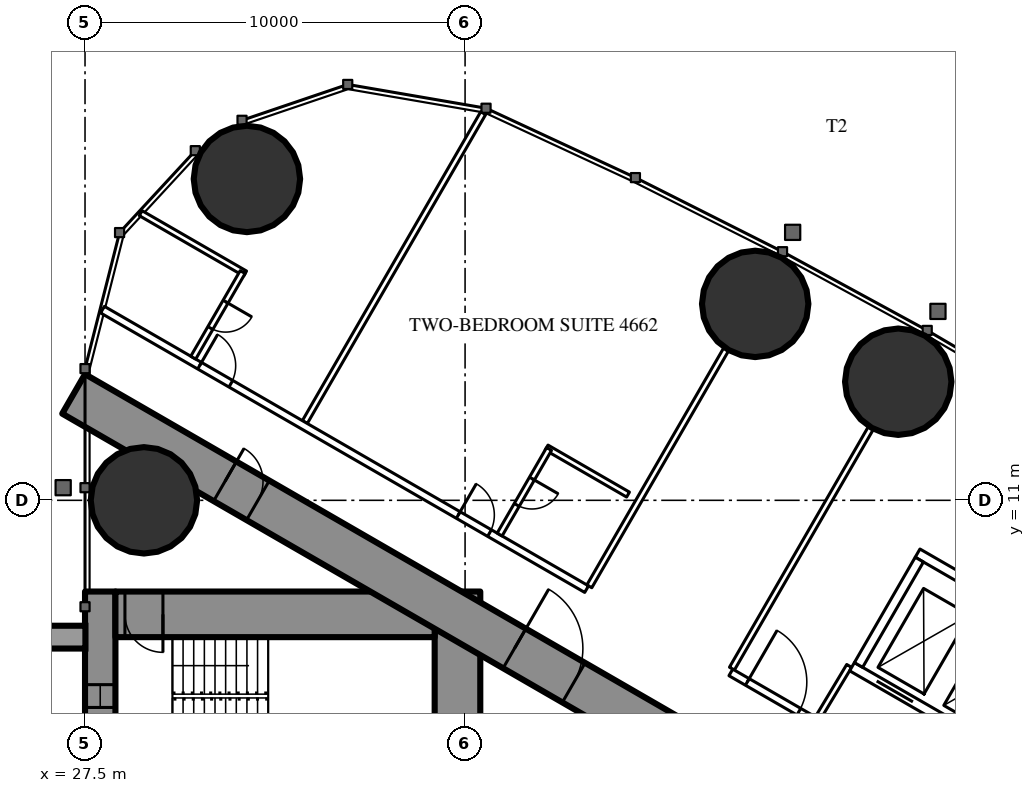
"""IFC4 building model, lengths in metres.
Left out: names, types, materials, properties, quantities, classifications, styles, units other than length and angle.
Written with IfcOpenShell. Run it as: python <this file> out.ifc"""

import sys

from ifc_helpers import new_model, si_unit, direction, frame, frame_2d, origin, origin_2d, place, context, subcontext, project, spatial, rectangle, circle, extrude, element, fill, save


model = new_model("IFC4")
c1 = context("Model", 3, precision=1e-05, world=origin(), true_north=direction((0.0, 1.0)))
c2 = subcontext(c1, "Body", "Model", "MODEL_VIEW")
j1 = project(units=[si_unit("LENGTHUNIT", "METRE"), si_unit("PLANEANGLEUNIT", "RADIAN")], contexts=[c1])
p1 = place(None, origin())
s1 = spatial("IfcSite", under=j1, at=p1, CompositionType="ELEMENT")
p2 = place(p1, origin())
s2 = spatial("IfcBuilding", under=s1, at=p2, CompositionType="ELEMENT")
p3 = place(p2, frame((0.0, 0.0, 173.8)))
s3 = spatial("IfcBuildingStorey", under=s2, at=p3, CompositionType="ELEMENT", Elevation=173.8)
for number, where, z_axis, x_axis in (
    (1, (31.76, 19.456, 0.0), (0.0, 0.0, 1.0), (1.0, 0.0, 0.0)),
    (2, (29.05, 11.0, 0.0), (0.0, 0.0, 1.0), (1.0, 0.0, 0.0)),
    (3, (48.897, 14.121, 0.0), (0.0, 0.0, 1.0), (1.0, 0.0, 0.0)),
    (4, (45.134, 16.168, 0.0), (0.0, 0.0, 1.0), (1.0, 0.0, 0.0)),
):
    element("IfcColumn", number, at=place(p3, frame(where, z_axis=z_axis, x_axis=x_axis)), inside=s3, PredefinedType="COLUMN", context=c2, shape_type="SweptSolid", body=[
        extrude(circle(Radius=1.4, at=origin_2d()), origin(), (0.0, 0.0, 1.0), 3.5),
    ])
p4 = place(p3, frame((27.9, -8.6, 0.0), z_axis=(0.0, 0.0, 1.0), x_axis=(0.0, 1.0, 0.0)))
e5 = element("IfcWall", 5, at=p4, inside=s3, PredefinedType="SHEAR", context=c2, shape_type="SweptSolid", body=[
    extrude(rectangle(XDim=17.2, YDim=0.8, at=frame_2d((8.6, 0.0))), origin(), (0.0, 0.0, 1.0), 3.5),
])
p5 = place(p4, frame((2.45, 0.0, 0.6)))
e6 = element("IfcOpeningElement", 6, at=p5, cuts=e5, PredefinedType="OPENING", context=c2, shape_type="SweptSolid", body=[
    extrude(rectangle(XDim=0.6, YDim=2.1, at=frame_2d((0.3, 1.05))), frame((0.0, 0.41, 0.0), z_axis=(0.0, -1.0, 0.0), x_axis=(1.0, 0.0, 0.0)), (0.0, 0.0, 1.0), 0.82),
])
p6 = place(p4, frame((14.15, 0.0, 0.6)))
e7 = element("IfcOpeningElement", 7, at=p6, cuts=e5, PredefinedType="OPENING", context=c2, shape_type="SweptSolid", body=[
    extrude(rectangle(XDim=0.6, YDim=2.1, at=frame_2d((0.3, 1.05))), frame((0.0, 0.41, 0.0), z_axis=(0.0, -1.0, 0.0), x_axis=(1.0, 0.0, 0.0)), (0.0, 0.0, 1.0), 0.82),
])
p7 = place(p3, frame((37.3, -8.6, 0.0), z_axis=(0.0, 0.0, 1.0), x_axis=(0.0, 1.0, 0.0)))
e8 = element("IfcWall", 8, at=p7, inside=s3, PredefinedType="SHEAR", context=c2, shape_type="SweptSolid", body=[
    extrude(rectangle(XDim=17.2, YDim=1.2, at=frame_2d((8.6, 0.0))), origin(), (0.0, 0.0, 1.0), 3.5),
])
p8 = place(p7, frame((7.7, 0.0, 0.0)))
e9 = element("IfcOpeningElement", 9, at=p8, cuts=e8, PredefinedType="OPENING", context=c2, shape_type="SweptSolid", body=[
    extrude(rectangle(XDim=1.8, YDim=2.2, at=frame_2d((0.9, 1.1))), frame((0.0, 0.61, 0.0), z_axis=(0.0, -1.0, 0.0), x_axis=(1.0, 0.0, 0.0)), (0.0, 0.0, 1.0), 1.22),
])
p9 = place(p3, frame((28.3, 8.0, 0.0), z_axis=(0.0, 0.0, 1.0), x_axis=(1.0, 0.0, 0.0)))
e10 = element("IfcWall", 10, at=p9, inside=s3, PredefinedType="SHEAR", context=c2, shape_type="SweptSolid", body=[
    extrude(rectangle(XDim=8.4, YDim=1.2, at=frame_2d((4.2, 0.0))), origin(), (0.0, 0.0, 1.0), 3.5),
])
p10 = place(p9, frame((0.25, 0.0, 0.0)))
e11 = element("IfcOpeningElement", 11, at=p10, cuts=e10, PredefinedType="OPENING", context=c2, shape_type="SweptSolid", body=[
    extrude(rectangle(XDim=1.0, YDim=2.2, at=frame_2d((0.5, 1.1))), frame((0.0, 0.61, 0.0), z_axis=(0.0, -1.0, 0.0), x_axis=(1.0, 0.0, 0.0)), (0.0, 0.0, 1.0), 1.22),
])
p11 = place(p3, frame((27.2, 13.8, 0.0), z_axis=(0.0, 0.0, 1.0), x_axis=(0.866024515034, -0.500001539357, 0.0)))
e12 = element("IfcWall", 12, at=p11, inside=s3, PredefinedType="SHEAR", context=c2, shape_type="SweptSolid", body=[
    extrude(rectangle(XDim=26.907, YDim=1.2, at=frame_2d((13.454, 0.0))), origin(), (0.0, 0.0, 1.0), 3.5),
])
p12 = place(p11, frame((4.6, 0.0, 0.0)))
e13 = element("IfcOpeningElement", 13, at=p12, cuts=e12, PredefinedType="OPENING", context=c2, shape_type="SweptSolid", body=[
    extrude(rectangle(XDim=1.0, YDim=2.2, at=frame_2d((0.5, 1.1))), frame((0.0, 0.61, 0.0), z_axis=(0.0, -1.0, 0.0), x_axis=(1.0, 0.0, 0.0)), (0.0, 0.0, 1.0), 1.22),
])
p13 = place(p11, frame((13.395, 0.0, 0.0)))
e14 = element("IfcOpeningElement", 14, at=p13, cuts=e12, PredefinedType="OPENING", context=c2, shape_type="SweptSolid", body=[
    extrude(rectangle(XDim=1.8, YDim=2.2, at=frame_2d((0.9, 1.1))), frame((0.0, 0.61, 0.0), z_axis=(0.0, -1.0, 0.0), x_axis=(1.0, 0.0, 0.0)), (0.0, 0.0, 1.0), 1.22),
])
p14 = place(p3, frame((33.284, 13.059, 0.0), z_axis=(0.0, 0.0, 1.0), x_axis=(0.499985904184, 0.866033541855, 0.0)))
e15 = element("IfcWall", 15, at=p14, inside=s3, PredefinedType="PARTITIONING", context=c2, shape_type="SweptSolid", body=[
    extrude(rectangle(XDim=9.385, YDim=0.15, at=frame_2d((4.693, 0.0))), origin(), (0.0, 0.0, 1.0), 3.25),
])
p15 = place(p3, frame((40.769, 8.737, 0.0), z_axis=(0.0, 0.0, 1.0), x_axis=(0.500013115284, 0.866017831539, 0.0)))
e16 = element("IfcWall", 16, at=p15, inside=s3, PredefinedType="PARTITIONING", context=c2, shape_type="SweptSolid", body=[
    extrude(rectangle(XDim=7.198, YDim=0.15, at=frame_2d((3.599, 0.0))), origin(), (0.0, 0.0, 1.0), 2.3),
])
p16 = place(p3, frame((44.521, 6.571, 0.0), z_axis=(0.0, 0.0, 1.0), x_axis=(0.500020376429, 0.866013639128, 0.0)))
e17 = element("IfcWall", 17, at=p16, inside=s3, PredefinedType="PARTITIONING", context=c2, shape_type="SweptSolid", body=[
    extrude(rectangle(XDim=7.306, YDim=0.15, at=frame_2d((3.653, 0.0))), origin(), (0.0, 0.0, 1.0), 2.3),
])
p17 = place(p3, frame((47.606, 6.643, 0.0), z_axis=(0.0, 0.0, 1.0), x_axis=(-0.514237157483, -0.857648031458, 0.0)))
e18 = element("IfcWall", 18, at=p17, inside=s3, PredefinedType="PARTITIONING", context=c2, shape_type="SweptSolid", body=[
    extrude(rectangle(XDim=1.805, YDim=0.15, at=frame_2d((0.902, 0.0))), origin(), (0.0, 0.0, 1.0), 3.25),
])
p18 = place(p3, frame((27.959, 16.017, 0.0), z_axis=(0.0, 0.0, 1.0), x_axis=(0.866024165033, -0.500002145574, 0.0)))
e19 = element("IfcWall", 19, at=p18, inside=s3, PredefinedType="PARTITIONING", context=c2, shape_type="SweptSolid", body=[
    extrude(rectangle(XDim=14.709, YDim=0.2, at=frame_2d((7.354, 0.0))), origin(), (0.0, 0.0, 1.0), 3.25),
])
p19 = place(p18, frame((10.809, 0.0, 0.0)))
e20 = element("IfcOpeningElement", 20, at=p19, cuts=e19, PredefinedType="OPENING", context=c2, shape_type="SweptSolid", body=[
    extrude(rectangle(XDim=0.95, YDim=2.2, at=frame_2d((0.475, 1.1))), frame((0.0, 0.11, 0.0), z_axis=(0.0, -1.0, 0.0), x_axis=(1.0, 0.0, 0.0)), (0.0, 0.0, 1.0), 0.22),
])
p20 = place(p18, frame((2.95, 0.0, 0.0)))
e21 = element("IfcOpeningElement", 21, at=p20, cuts=e19, PredefinedType="OPENING", context=c2, shape_type="SweptSolid", body=[
    extrude(rectangle(XDim=0.95, YDim=2.2, at=frame_2d((0.475, 1.1))), frame((0.0, 0.11, 0.0), z_axis=(0.0, -1.0, 0.0), x_axis=(1.0, 0.0, 0.0)), (0.0, 0.0, 1.0), 0.22),
])
p21 = place(p3, frame((44.493, 6.472, 0.0), z_axis=(0.0, 0.0, 1.0), x_axis=(0.866027140358, -0.499996992154, 0.0)))
e22 = element("IfcWall", 22, at=p21, inside=s3, PredefinedType="PARTITIONING", context=c2, shape_type="SweptSolid", body=[
    extrude(rectangle(XDim=2.566, YDim=0.2, at=frame_2d((1.283, 0.0))), origin(), (0.0, 0.0, 1.0), 3.25),
])
p22 = place(p21, frame((0.5, 0.0, 0.0)))
e23 = element("IfcOpeningElement", 23, at=p22, cuts=e22, PredefinedType="OPENING", context=c2, shape_type="SweptSolid", body=[
    extrude(rectangle(XDim=1.566, YDim=2.2, at=frame_2d((0.783, 1.1))), frame((0.0, 0.11, 0.0), z_axis=(0.0, -1.0, 0.0), x_axis=(1.0, 0.0, 0.0)), (0.0, 0.0, 1.0), 0.22),
])
p23 = place(p3, frame((39.645, 12.389, 0.0), z_axis=(0.0, 0.0, 1.0), x_axis=(0.866006523861, -0.500032699561, 0.0)))
e24 = element("IfcWall", 24, at=p23, inside=s3, PredefinedType="PARTITIONING", context=c2, shape_type="SweptSolid", body=[
    extrude(rectangle(XDim=2.475, YDim=0.15, at=frame_2d((1.237, 0.0))), origin(), (0.0, 0.0, 1.0), 3.25),
])
p24 = place(p3, frame((38.409, 10.099, 0.0), z_axis=(0.0, 0.0, 1.0), x_axis=(0.500006934395, 0.866021400173, 0.0)))
e25 = element("IfcWall", 25, at=p24, inside=s3, PredefinedType="PARTITIONING", context=c2, shape_type="SweptSolid", body=[
    extrude(rectangle(XDim=2.6, YDim=0.15, at=frame_2d((1.3, 0.0))), origin(), (0.0, 0.0, 1.0), 3.25),
])
p25 = place(p24, frame((0.9, 0.0, 0.0)))
e26 = element("IfcOpeningElement", 26, at=p25, cuts=e25, PredefinedType="OPENING", context=c2, shape_type="SweptSolid", body=[
    extrude(rectangle(XDim=0.8, YDim=2.2, at=frame_2d((0.4, 1.1))), frame((0.0, 0.085, 0.0), z_axis=(0.0, -1.0, 0.0), x_axis=(1.0, 0.0, 0.0)), (0.0, 0.0, 1.0), 0.17),
])
p26 = place(p3, frame((28.965, 18.554, 0.0), z_axis=(0.0, 0.0, 1.0), x_axis=(0.866008740531, -0.500028860491, 0.0)))
e27 = element("IfcWall", 27, at=p26, inside=s3, PredefinedType="PARTITIONING", context=c2, shape_type="SweptSolid", body=[
    extrude(rectangle(XDim=3.173, YDim=0.15, at=frame_2d((1.586, 0.0))), origin(), (0.0, 0.0, 1.0), 3.25),
])
p27 = place(p3, frame((30.348, 14.754, 0.0), z_axis=(0.0, 0.0, 1.0), x_axis=(0.500006934395, 0.866021400173, 0.0)))
e28 = element("IfcWall", 28, at=p27, inside=s3, PredefinedType="PARTITIONING", context=c2, shape_type="SweptSolid", body=[
    extrude(rectangle(XDim=2.6, YDim=0.15, at=frame_2d((1.3, 0.0))), origin(), (0.0, 0.0, 1.0), 2.3),
])
p28 = place(p27, frame((0.9, 0.0, 0.0)))
e29 = element("IfcOpeningElement", 29, at=p28, cuts=e28, PredefinedType="OPENING", context=c2, shape_type="SweptSolid", body=[
    extrude(rectangle(XDim=0.8, YDim=2.2, at=frame_2d((0.4, 1.1))), frame((0.0, 0.085, 0.0), z_axis=(0.0, -1.0, 0.0), x_axis=(1.0, 0.0, 0.0)), (0.0, 0.0, 1.0), 0.17),
])
p29 = place(p3, frame((47.681, 6.622, 0.0), z_axis=(0.0, 0.0, 1.0), x_axis=(0.86603344179, -0.499986077507, 0.0)))
e30 = element("IfcWall", 30, at=p29, inside=s3, PredefinedType="PARTITIONING", context=c2, shape_type="SweptSolid", body=[
    extrude(rectangle(XDim=6.6, YDim=0.25, at=frame_2d((3.3, 0.0))), origin(), (0.0, 0.0, 1.0), 3.25),
])
p30 = place(p29, frame((0.75, 0.0, 0.0)))
e31 = element("IfcOpeningElement", 31, at=p30, cuts=e30, PredefinedType="OPENING", context=c2, shape_type="SweptSolid", body=[
    extrude(rectangle(XDim=1.1, YDim=2.2, at=frame_2d((0.55, 1.1))), frame((0.0, 0.135, 0.0), z_axis=(0.0, -1.0, 0.0), x_axis=(1.0, 0.0, 0.0)), (0.0, 0.0, 1.0), 0.27),
])
p31 = place(p29, frame((2.75, 0.0, 0.0)))
e32 = element("IfcOpeningElement", 32, at=p31, cuts=e30, PredefinedType="OPENING", context=c2, shape_type="SweptSolid", body=[
    extrude(rectangle(XDim=1.1, YDim=2.2, at=frame_2d((0.55, 1.1))), frame((0.0, 0.135, 0.0), z_axis=(0.0, -1.0, 0.0), x_axis=(1.0, 0.0, 0.0)), (0.0, 0.0, 1.0), 0.27),
])
p32 = place(p29, frame((4.75, 0.0, 0.0)))
e33 = element("IfcOpeningElement", 33, at=p32, cuts=e30, PredefinedType="OPENING", context=c2, shape_type="SweptSolid", body=[
    extrude(rectangle(XDim=1.1, YDim=2.2, at=frame_2d((0.55, 1.1))), frame((0.0, 0.135, 0.0), z_axis=(0.0, -1.0, 0.0), x_axis=(1.0, 0.0, 0.0)), (0.0, 0.0, 1.0), 0.27),
])
p33 = place(p3, frame((49.406, 9.611, 0.0), z_axis=(0.0, 0.0, 1.0), x_axis=(0.86603344179, -0.499986077507, 0.0)))
e34 = element("IfcWall", 34, at=p33, inside=s3, PredefinedType="PARTITIONING", context=c2, shape_type="SweptSolid", body=[
    extrude(rectangle(XDim=6.6, YDim=0.25, at=frame_2d((3.3, 0.0))), origin(), (0.0, 0.0, 1.0), 3.25),
])
p34 = place(p3, frame((47.852, 6.668, 0.0), z_axis=(0.0, 0.0, 1.0), x_axis=(0.499929347863, 0.866066190972, 0.0)))
e35 = element("IfcWall", 35, at=p34, inside=s3, PredefinedType="PARTITIONING", context=c2, shape_type="SweptSolid", body=[
    extrude(rectangle(XDim=3.201, YDim=0.25, at=frame_2d((1.6, 0.0))), origin(), (0.0, 0.0, 1.0), 3.25),
])
p35 = place(p25, origin())
e36 = element("IfcDoor", 36, at=p35, inside=s3, OperationType="SINGLE_SWING_RIGHT", PredefinedType="DOOR", context=c2, shape_type="SweptSolid", body=[
    extrude(rectangle(XDim=0.8, YDim=2.2, at=frame_2d((0.4, 1.1))), frame((0.0, 0.025, 0.0), z_axis=(0.0, -1.0, 0.0), x_axis=(1.0, 0.0, 0.0)), (0.0, 0.0, 1.0), 0.05),
])
fill(e26, e36)
p36 = place(p19, origin())
e37 = element("IfcDoor", 37, at=p36, inside=s3, OperationType="SINGLE_SWING_LEFT", PredefinedType="DOOR", context=c2, shape_type="SweptSolid", body=[
    extrude(rectangle(XDim=0.95, YDim=2.2, at=frame_2d((0.475, 1.1))), frame((0.0, 0.025, 0.0), z_axis=(0.0, -1.0, 0.0), x_axis=(1.0, 0.0, 0.0)), (0.0, 0.0, 1.0), 0.05),
])
fill(e20, e37)
p37 = place(p28, origin())
e38 = element("IfcDoor", 38, at=p37, inside=s3, OperationType="SINGLE_SWING_RIGHT", PredefinedType="DOOR", context=c2, shape_type="SweptSolid", body=[
    extrude(rectangle(XDim=0.8, YDim=2.2, at=frame_2d((0.4, 1.1))), frame((0.0, 0.025, 0.0), z_axis=(0.0, -1.0, 0.0), x_axis=(1.0, 0.0, 0.0)), (0.0, 0.0, 1.0), 0.05),
])
fill(e29, e38)
p38 = place(p20, origin())
e39 = element("IfcDoor", 39, at=p38, inside=s3, OperationType="SINGLE_SWING_LEFT", PredefinedType="DOOR", context=c2, shape_type="SweptSolid", body=[
    extrude(rectangle(XDim=0.95, YDim=2.2, at=frame_2d((0.475, 1.1))), frame((0.0, 0.025, 0.0), z_axis=(0.0, -1.0, 0.0), x_axis=(1.0, 0.0, 0.0)), (0.0, 0.0, 1.0), 0.05),
])
fill(e21, e39)
p39 = place(p22, origin())
e40 = element("IfcDoor", 40, at=p39, inside=s3, OperationType="SINGLE_SWING_LEFT", PredefinedType="DOOR", context=c2, shape_type="SweptSolid", body=[
    extrude(rectangle(XDim=1.566, YDim=2.2, at=frame_2d((0.783, 1.1))), frame((0.0, 0.025, 0.0), z_axis=(0.0, -1.0, 0.0), x_axis=(1.0, 0.0, 0.0)), (0.0, 0.0, 1.0), 0.05),
])
fill(e23, e40)
p40 = place(p12, origin())
e41 = element("IfcDoor", 41, at=p40, inside=s3, OperationType="SINGLE_SWING_LEFT", PredefinedType="DOOR", context=c2, shape_type="SweptSolid", body=[
    extrude(rectangle(XDim=1.0, YDim=2.2, at=frame_2d((0.5, 1.1))), frame((0.0, 0.025, 0.0), z_axis=(0.0, -1.0, 0.0), x_axis=(1.0, 0.0, 0.0)), (0.0, 0.0, 1.0), 0.05),
])
fill(e13, e41)
p41 = place(p13, origin())
e42 = element("IfcDoor", 42, at=p41, inside=s3, OperationType="DOUBLE_DOOR_SINGLE_SWING", PredefinedType="DOOR", context=c2, shape_type="SweptSolid", body=[
    extrude(rectangle(XDim=1.8, YDim=2.2, at=frame_2d((0.9, 1.1))), frame((0.0, 0.025, 0.0), z_axis=(0.0, -1.0, 0.0), x_axis=(1.0, 0.0, 0.0)), (0.0, 0.0, 1.0), 0.05),
])
fill(e14, e42)
p42 = place(p10, origin())
e43 = element("IfcDoor", 43, at=p42, inside=s3, OperationType="SINGLE_SWING_RIGHT", PredefinedType="DOOR", context=c2, shape_type="SweptSolid", body=[
    extrude(rectangle(XDim=1.0, YDim=2.2, at=frame_2d((0.5, 1.1))), frame((0.0, 0.025, 0.0), z_axis=(0.0, -1.0, 0.0), x_axis=(1.0, 0.0, 0.0)), (0.0, 0.0, 1.0), 0.05),
])
fill(e11, e43)
p43 = place(p30, origin())
e44 = element("IfcDoor", 44, at=p43, inside=s3, OperationType="DOUBLE_DOOR_SLIDING", PredefinedType="USERDEFINED", context=c2, shape_type="SweptSolid", body=[
    extrude(rectangle(XDim=1.1, YDim=2.2, at=frame_2d((0.55, 1.1))), frame((0.0, 0.025, 0.0), z_axis=(0.0, -1.0, 0.0), x_axis=(1.0, 0.0, 0.0)), (0.0, 0.0, 1.0), 0.05),
])
fill(e31, e44)
p44 = place(p6, origin())
e45 = element("IfcWindow", 45, at=p44, inside=s3, PartitioningType="SINGLE_PANEL", PredefinedType="WINDOW", context=c2, shape_type="SweptSolid", body=[
    extrude(rectangle(XDim=0.6, YDim=2.1, at=frame_2d((0.3, 1.05))), frame((0.0, 0.03, 0.0), z_axis=(0.0, -1.0, 0.0), x_axis=(1.0, 0.0, 0.0)), (0.0, 0.0, 1.0), 0.06),
])
fill(e7, e45)
save(model, sys.argv[1])
